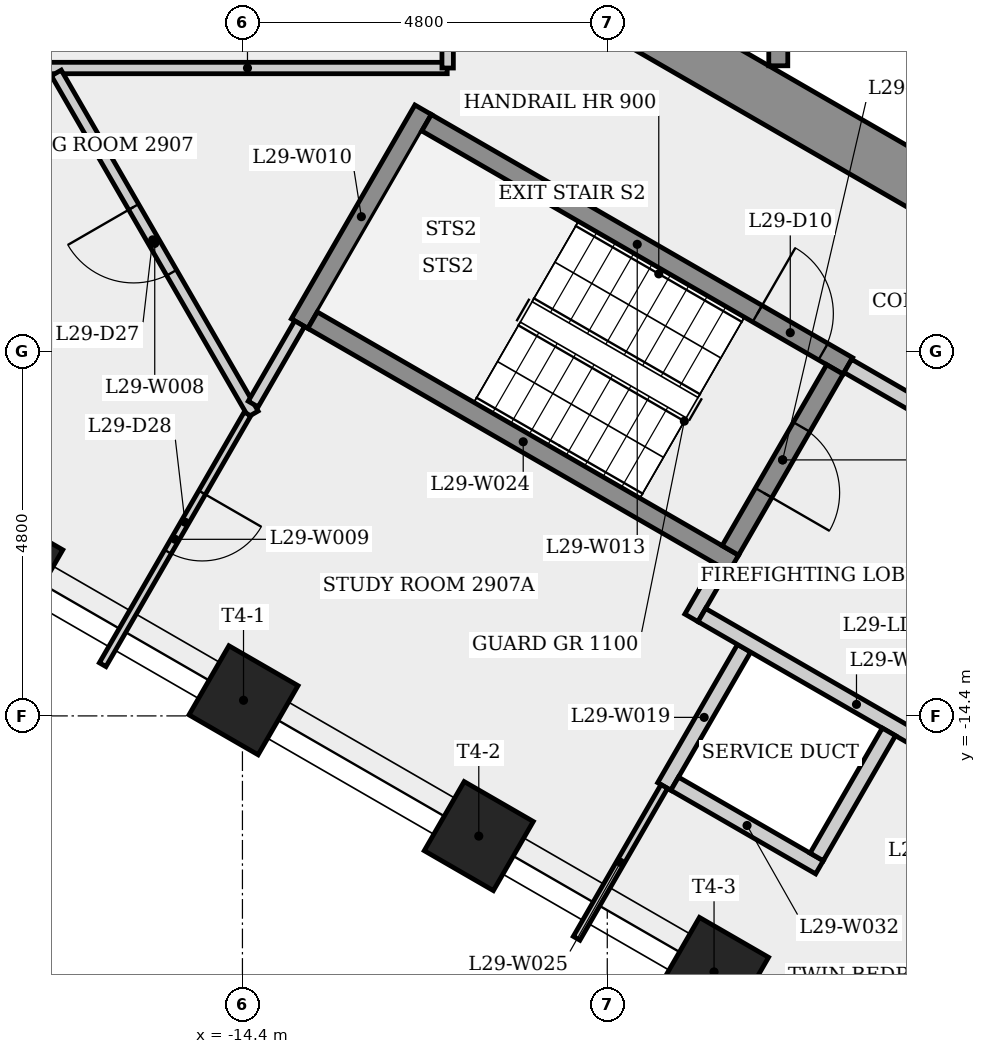
"""IFC4 building model, lengths in metres.
Left out: names, types, materials, properties, quantities, classifications, styles, units other than length and angle.
Written with IfcOpenShell. Run it as: python <this file> out.ifc"""

import sys

from ifc_helpers import new_model, si_unit, direction, frame, frame_2d, origin, origin_2d, place, context, subcontext, project, spatial, rectangle, extrude, element, fill, save


model = new_model("IFC4")
c1 = context("Model", 3, precision=1e-05, world=origin(), true_north=direction((0.0, 1.0)))
c2 = subcontext(c1, "Body", "Model", "MODEL_VIEW")
j1 = project(units=[si_unit("LENGTHUNIT", "METRE"), si_unit("PLANEANGLEUNIT", "RADIAN")], contexts=[c1])
p1 = place(None, origin())
s1 = spatial("IfcSite", under=j1, at=p1, CompositionType="ELEMENT")
p2 = place(p1, origin())
s2 = spatial("IfcBuilding", under=s1, at=p2, CompositionType="ELEMENT")
p3 = place(p2, frame((0.0, 0.0, 110.3)))
s3 = spatial("IfcBuildingStorey", under=s2, at=p3, CompositionType="ELEMENT", Elevation=110.3)
p4 = place(p3, frame((-9.325, -5.182, 0.0), z_axis=(0.0, 0.0, 1.0), x_axis=(0.866023993627, -0.500002442456, 0.0)))
e1 = element("IfcWall", 1, at=p4, inside=s3, PredefinedType="SHEAR", context=c2, shape_type="SweptSolid", body=[
    extrude(rectangle(XDim=10.97, YDim=0.7, at=frame_2d((5.485, 0.0))), origin(), (0.0, 0.0, 1.0), 3.4),
])
p5 = place(p4, frame((5.682, 0.0, 0.0)))
e2 = element("IfcOpeningElement", 2, at=p5, cuts=e1, PredefinedType="OPENING", context=c2, shape_type="SweptSolid", body=[
    extrude(rectangle(XDim=0.9, YDim=2.1, at=frame_2d((0.45, 1.05))), frame((0.0, 0.36, 0.0), z_axis=(0.0, -1.0, 0.0), x_axis=(1.0, 0.0, 0.0)), (0.0, 0.0, 1.0), 0.72),
])
for number, where, z_axis, x_axis in (
    (3, (-17.481, -12.407, 0.0), (0.0, 0.0, 1.0), (-0.5, -0.866, 0.0)),
    (4, (-14.386, -14.194, 0.0), (0.0, 0.0, 1.0), (-0.5, -0.866, 0.0)),
    (5, (-11.291, -15.981, 0.0), (0.0, 0.0, 1.0), (-0.5, -0.866, 0.0)),
    (6, (-8.195, -17.769, 0.0), (0.0, 0.0, 1.0), (-0.5, -0.866, 0.0)),
):
    element("IfcColumn", number, at=place(p3, frame(where, z_axis=z_axis, x_axis=x_axis)), inside=s3, PredefinedType="COLUMN", context=c2, shape_type="SweptSolid", body=[
        extrude(rectangle(XDim=1.05, YDim=1.05, at=origin_2d()), origin(), (0.0, 0.0, 1.0), 3.4),
    ])
p6 = place(p3, frame((-16.961, -5.875, 0.0), z_axis=(0.0, 0.0, 1.0), x_axis=(1.0, 0.0, 0.0)))
e7 = element("IfcWall", 7, at=p6, inside=s3, PredefinedType="PARTITIONING", context=c2, shape_type="SweptSolid", body=[
    extrude(rectangle(XDim=5.256, YDim=0.15, at=frame_2d((2.628, 0.0))), origin(), (0.0, 0.0, 1.0), 3.05),
])
p7 = place(p3, frame((-14.259, -10.427, 0.0), z_axis=(0.0, 0.0, 1.0), x_axis=(-0.500001205343, 0.866024707878, 0.0)))
e8 = element("IfcWall", 8, at=p7, inside=s3, PredefinedType="PARTITIONING", context=c2, shape_type="SweptSolid", body=[
    extrude(rectangle(XDim=5.181, YDim=0.15, at=frame_2d((2.59, 0.0))), origin(), (0.0, 0.0, 1.0), 3.05),
])
p8 = place(p7, frame((2.145, 0.0, 0.0)))
e9 = element("IfcOpeningElement", 9, at=p8, cuts=e8, PredefinedType="OPENING", context=c2, shape_type="SweptSolid", body=[
    extrude(rectangle(XDim=1.0, YDim=2.1, at=frame_2d((0.5, 1.05))), frame((0.0, 0.085, 0.0), z_axis=(0.0, -1.0, 0.0), x_axis=(1.0, 0.0, 0.0)), (0.0, 0.0, 1.0), 0.17),
])
p9 = place(p3, frame((-14.334, -10.427, 0.0), z_axis=(0.0, 0.0, 1.0), x_axis=(-0.500005339912, -0.866022320763, 0.0)))
e10 = element("IfcWall", 10, at=p9, inside=s3, PredefinedType="PARTITIONING", context=c2, shape_type="SweptSolid", body=[
    extrude(rectangle(XDim=3.81, YDim=0.1, at=frame_2d((1.905, 0.0))), origin(), (0.0, 0.0, 1.0), 3.05),
])
p10 = place(p9, frame((1.194, 0.0, 0.0)))
e11 = element("IfcOpeningElement", 11, at=p10, cuts=e10, PredefinedType="OPENING", context=c2, shape_type="SweptSolid", body=[
    extrude(rectangle(XDim=0.9, YDim=2.1, at=frame_2d((0.45, 1.05))), frame((0.0, 0.06, 0.0), z_axis=(0.0, -1.0, 0.0), x_axis=(1.0, 0.0, 0.0)), (0.0, 0.0, 1.0), 0.12),
])
p11 = place(p3, frame((-13.648, -9.239, 0.0), z_axis=(0.0, 0.0, 1.0), x_axis=(0.500017246033, 0.866015446554, 0.0)))
e12 = element("IfcWall", 12, at=p11, inside=s3, PredefinedType="SHEAR", context=c2, shape_type="SweptSolid", body=[
    extrude(rectangle(XDim=3.25, YDim=0.25, at=frame_2d((1.625, 0.0))), origin(), (0.0, 0.0, 1.0), 3.05),
])
p12 = place(p3, frame((-13.648, -9.239, 0.0), z_axis=(0.0, 0.0, 1.0), x_axis=(-0.500114474492, -0.865959301817, 0.0)))
e13 = element("IfcWall", 13, at=p12, inside=s3, PredefinedType="PARTITIONING", context=c2, shape_type="SweptSolid", body=[
    extrude(rectangle(XDim=1.222, YDim=0.15, at=frame_2d((0.611, 0.0))), origin(), (0.0, 0.0, 1.0), 3.05),
])
p13 = place(p3, frame((-11.977, -6.595, 0.0), z_axis=(0.0, 0.0, 1.0), x_axis=(0.866025499775, -0.499999833739, 0.0)))
e14 = element("IfcWall", 14, at=p13, inside=s3, PredefinedType="SHEAR", context=c2, shape_type="SweptSolid", body=[
    extrude(rectangle(XDim=6.4, YDim=0.25, at=frame_2d((3.2, 0.0))), origin(), (0.0, 0.0, 1.0), 3.05),
])
p14 = place(p13, frame((5.025, 0.0, 0.0)))
e15 = element("IfcOpeningElement", 15, at=p14, cuts=e14, PredefinedType="OPENING", context=c2, shape_type="SweptSolid", body=[
    extrude(rectangle(XDim=1.0, YDim=2.1, at=frame_2d((0.5, 1.05))), frame((0.0, 0.135, 0.0), z_axis=(0.0, -1.0, 0.0), x_axis=(1.0, 0.0, 0.0)), (0.0, 0.0, 1.0), 0.27),
])
p15 = place(p3, frame((-11.7, 5.95, 0.0), z_axis=(0.0, 0.0, 1.0), x_axis=(0.0, -1.0, 0.0)))
e16 = element("IfcWall", 16, at=p15, inside=s3, PredefinedType="PARTITIONING", context=c2, shape_type="SweptSolid", body=[
    extrude(rectangle(XDim=11.825, YDim=0.15, at=frame_2d((5.913, 0.0))), origin(), (0.0, 0.0, 1.0), 3.05),
])
p16 = place(p15, frame((7.424, 0.0, 0.0)))
e17 = element("IfcOpeningElement", 17, at=p16, cuts=e16, PredefinedType="OPENING", context=c2, shape_type="SweptSolid", body=[
    extrude(rectangle(XDim=1.0, YDim=2.1, at=frame_2d((0.5, 1.05))), frame((0.0, 0.085, 0.0), z_axis=(0.0, -1.0, 0.0), x_axis=(1.0, 0.0, 0.0)), (0.0, 0.0, 1.0), 0.17),
])
p17 = place(p3, frame((-8.85, -15.329, 0.0), z_axis=(0.0, 0.0, 1.0), x_axis=(0.500027713859, 0.866009402589, 0.0)))
e18 = element("IfcWall", 18, at=p17, inside=s3, PredefinedType="PLUMBINGWALL", context=c2, shape_type="SweptSolid", body=[
    extrude(rectangle(XDim=2.1, YDim=0.2, at=frame_2d((1.05, 0.0))), origin(), (0.0, 0.0, 1.0), 3.05),
])
p18 = place(p3, frame((-8.493, -13.11, 0.0), z_axis=(0.0, 0.0, 1.0), x_axis=(0.500067724834, 0.865986299303, 0.0)))
e19 = element("IfcWall", 19, at=p18, inside=s3, PredefinedType="PARTITIONING", context=c2, shape_type="SweptSolid", body=[
    extrude(rectangle(XDim=0.775, YDim=0.2, at=frame_2d((0.388, 0.0))), origin(), (0.0, 0.0, 1.0), 3.05),
])
p19 = place(p3, frame((-7.935, -12.393, 0.0), z_axis=(0.0, 0.0, 1.0), x_axis=(-0.866025499775, 0.499999833739, 0.0)))
e20 = element("IfcWall", 20, at=p19, inside=s3, PredefinedType="SHEAR", context=c2, shape_type="SweptSolid", body=[
    extrude(rectangle(XDim=6.4, YDim=0.25, at=frame_2d((3.2, 0.0))), origin(), (0.0, 0.0, 1.0), 3.05),
])
p20 = place(p3, frame((-10.003, -17.326, 0.0), z_axis=(0.0, 0.0, 1.0), x_axis=(0.500009533716, 0.866019899421, 0.0)))
e21 = element("IfcWall", 21, at=p20, inside=s3, PredefinedType="PARTITIONING", context=c2, shape_type="SweptSolid", body=[
    extrude(rectangle(XDim=2.307, YDim=0.1, at=frame_2d((1.153, 0.0))), origin(), (0.0, 0.0, 1.0), 3.05),
])
p21 = place(p3, frame((-8.356, -13.073, 0.0), z_axis=(0.0, 0.0, 1.0), x_axis=(0.866038532462, -0.499977259774, 0.0)))
e22 = element("IfcWall", 22, at=p21, inside=s3, PredefinedType="PARTITIONING", context=c2, shape_type="SweptSolid", body=[
    extrude(rectangle(XDim=4.7, YDim=0.2, at=frame_2d((2.35, 0.0))), origin(), (0.0, 0.0, 1.0), 3.05),
])
p22 = place(p3, frame((-7.35, -5.846, 0.0), z_axis=(0.0, 0.0, 1.0), x_axis=(0.0, 1.0, 0.0)))
e23 = element("IfcWall", 23, at=p22, inside=s3, PredefinedType="SHEAR", context=c2, shape_type="SweptSolid", body=[
    extrude(rectangle(XDim=4.171, YDim=0.25, at=frame_2d((2.085, 0.0))), origin(), (0.0, 0.0, 1.0), 3.05),
])
p23 = place(p3, frame((-6.808, -16.392, 0.0), z_axis=(0.0, 0.0, 1.0), x_axis=(-0.866008176907, 0.50002983664, 0.0)))
e24 = element("IfcWall", 24, at=p23, inside=s3, PredefinedType="PLUMBINGWALL", context=c2, shape_type="SweptSolid", body=[
    extrude(rectangle(XDim=2.2, YDim=0.2, at=frame_2d((1.1, 0.0))), origin(), (0.0, 0.0, 1.0), 3.05),
])
p24 = place(p3, frame((-6.605, -9.841, 0.0), z_axis=(0.0, 0.0, 1.0), x_axis=(-0.499996545922, -0.866027397988, 0.0)))
e25 = element("IfcWall", 25, at=p24, inside=s3, PredefinedType="SHEAR", context=c2, shape_type="SweptSolid", body=[
    extrude(rectangle(XDim=2.75, YDim=0.25, at=frame_2d((1.375, 0.0))), origin(), (0.0, 0.0, 1.0), 3.05),
])
p25 = place(p24, frame((0.875, 0.0, 0.0)))
e26 = element("IfcOpeningElement", 26, at=p25, cuts=e25, PredefinedType="OPENING", context=c2, shape_type="SweptSolid", body=[
    extrude(rectangle(XDim=1.0, YDim=2.1, at=frame_2d((0.5, 1.05))), frame((0.0, 0.135, 0.0), z_axis=(0.0, -1.0, 0.0), x_axis=(1.0, 0.0, 0.0)), (0.0, 0.0, 1.0), 0.27),
])
p26 = place(p3, frame((-6.435, -9.795, 0.0), z_axis=(0.0, 0.0, 1.0), x_axis=(0.866012907634, -0.500021643343, 0.0)))
e27 = element("IfcWall", 27, at=p26, inside=s3, PredefinedType="PARTITIONING", context=c2, shape_type="SweptSolid", body=[
    extrude(rectangle(XDim=4.45, YDim=0.2, at=frame_2d((2.225, 0.0))), origin(), (0.0, 0.0, 1.0), 3.05),
])
p27 = place(p26, frame((1.675, 0.0, 0.0)))
e28 = element("IfcOpeningElement", 28, at=p27, cuts=e27, PredefinedType="OPENING", context=c2, shape_type="SweptSolid", body=[
    extrude(rectangle(XDim=1.1, YDim=2.1, at=frame_2d((0.55, 1.05))), frame((0.0, 0.11, 0.0), z_axis=(0.0, -1.0, 0.0), x_axis=(1.0, 0.0, 0.0)), (0.0, 0.0, 1.0), 0.22),
])
p28 = place(p3, frame((-5.895, -14.61, 0.0), z_axis=(0.0, 0.0, 1.0), x_axis=(-0.500022797313, -0.86601224135, 0.0)))
e29 = element("IfcWall", 29, at=p28, inside=s3, PredefinedType="PLUMBINGWALL", context=c2, shape_type="SweptSolid", body=[
    extrude(rectangle(XDim=1.9, YDim=0.2, at=frame_2d((0.95, 0.0))), origin(), (0.0, 0.0, 1.0), 3.05),
])
p29 = place(p14, origin())
e30 = element("IfcDoor", 30, at=p29, inside=s3, OperationType="SINGLE_SWING_LEFT", PredefinedType="DOOR", context=c2, shape_type="SweptSolid", body=[
    extrude(rectangle(XDim=1.0, YDim=2.1, at=frame_2d((0.5, 1.05))), frame((0.0, 0.025, 0.0), z_axis=(0.0, -1.0, 0.0), x_axis=(1.0, 0.0, 0.0)), (0.0, 0.0, 1.0), 0.05),
])
fill(e15, e30)
p30 = place(p25, origin())
e31 = element("IfcDoor", 31, at=p30, inside=s3, OperationType="SINGLE_SWING_RIGHT", PredefinedType="DOOR", context=c2, shape_type="SweptSolid", body=[
    extrude(rectangle(XDim=1.0, YDim=2.1, at=frame_2d((0.5, 1.05))), frame((0.0, 0.025, 0.0), z_axis=(0.0, -1.0, 0.0), x_axis=(1.0, 0.0, 0.0)), (0.0, 0.0, 1.0), 0.05),
])
fill(e26, e31)
p31 = place(p8, origin())
e32 = element("IfcDoor", 32, at=p31, inside=s3, OperationType="SINGLE_SWING_RIGHT", PredefinedType="DOOR", context=c2, shape_type="SweptSolid", body=[
    extrude(rectangle(XDim=1.0, YDim=2.1, at=frame_2d((0.5, 1.05))), frame((0.0, 0.025, 0.0), z_axis=(0.0, -1.0, 0.0), x_axis=(1.0, 0.0, 0.0)), (0.0, 0.0, 1.0), 0.05),
])
fill(e9, e32)
p32 = place(p10, origin())
e33 = element("IfcDoor", 33, at=p32, inside=s3, OperationType="SINGLE_SWING_LEFT", PredefinedType="DOOR", context=c2, shape_type="SweptSolid", body=[
    extrude(rectangle(XDim=0.9, YDim=2.1, at=frame_2d((0.45, 1.05))), frame((0.0, 0.025, 0.0), z_axis=(0.0, -1.0, 0.0), x_axis=(1.0, 0.0, 0.0)), (0.0, 0.0, 1.0), 0.05),
])
fill(e11, e33)
save(model, sys.argv[1])
